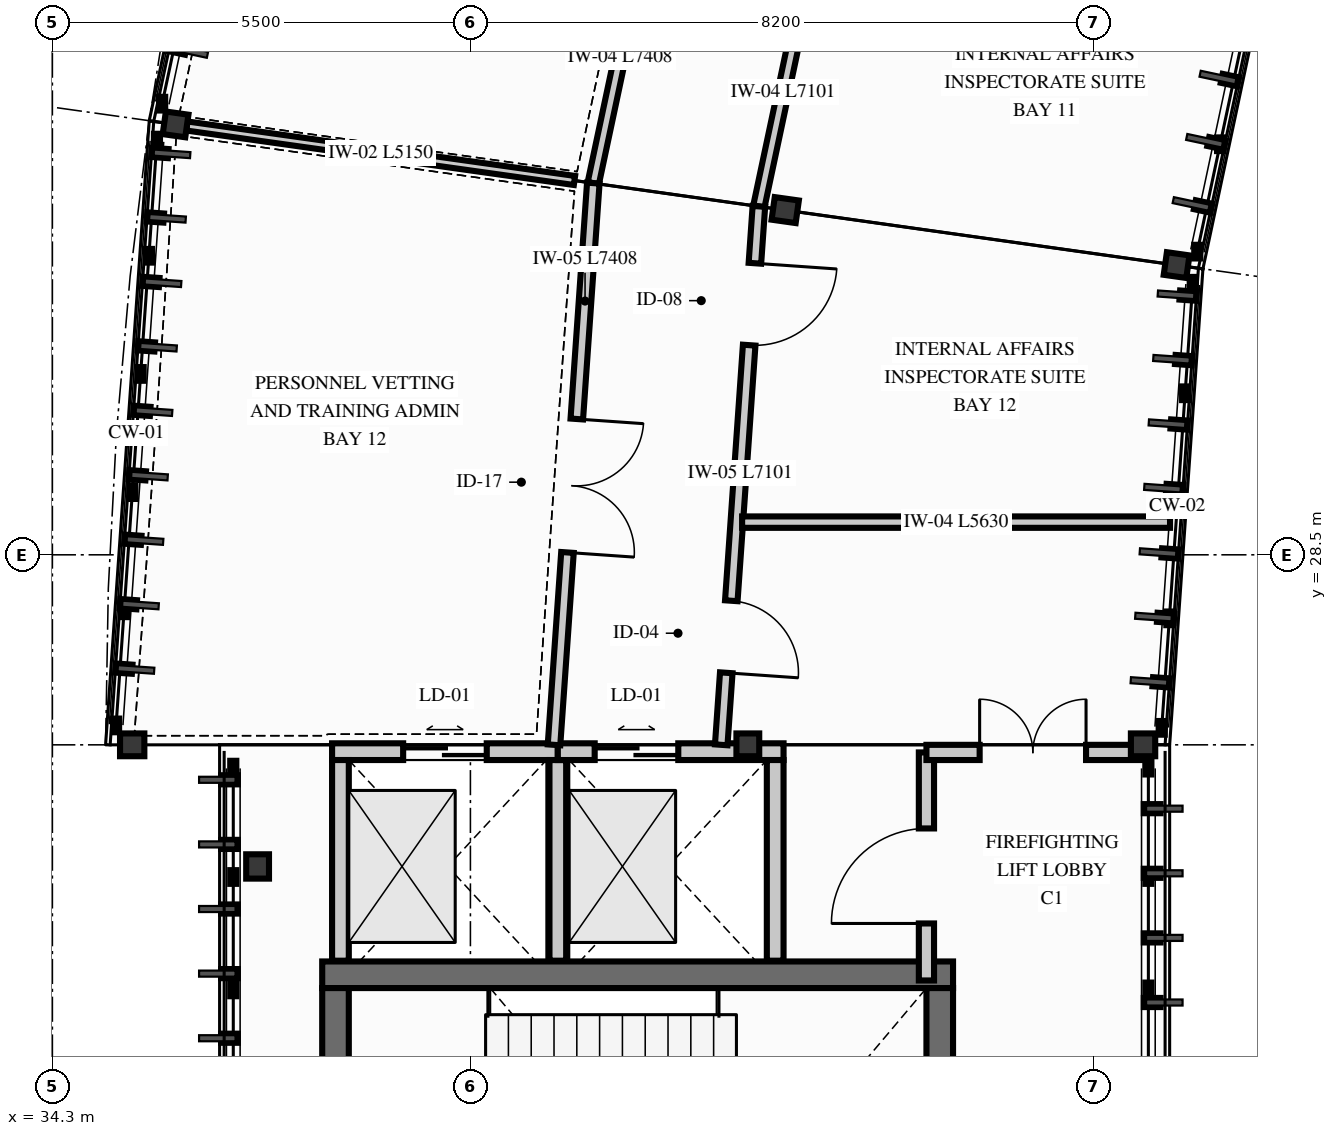
"""IFC4 building model, lengths in metres.
Left out: names, types, materials, properties, quantities, classifications, styles, units other than length and angle.
Written with IfcOpenShell. Run it as: python <this file> out.ifc"""

import sys

from ifc_helpers import new_model, si_unit, direction, frame, frame_2d, origin, origin_2d, place, context, subcontext, project, spatial, rectangle, i_section, extrude, element, fill, save


model = new_model("IFC4")
c1 = context("Model", 3, precision=1e-05, world=origin(), true_north=direction((0.0, 1.0)))
c2 = subcontext(c1, "Body", "Model", "MODEL_VIEW")
j1 = project(units=[si_unit("LENGTHUNIT", "METRE"), si_unit("PLANEANGLEUNIT", "RADIAN")], contexts=[c1])
p1 = place(None, origin())
s1 = spatial("IfcSite", under=j1, at=p1, CompositionType="ELEMENT")
p2 = place(p1, origin())
s2 = spatial("IfcBuilding", under=s1, at=p2, CompositionType="ELEMENT")
p3 = place(p2, frame((0.0, 0.0, 21.6)))
s3 = spatial("IfcBuildingStorey", under=s2, at=p3, CompositionType="ELEMENT", Elevation=21.6)
p4 = place(p3, frame((37.85, 22.975, 0.0), z_axis=(0.0, 0.0, 1.0), x_axis=(1.0, 0.0, 0.0)))
e1 = element("IfcWall", 1, at=p4, inside=s3, PredefinedType="SHEAR", context=c2, shape_type="SweptSolid", body=[
    extrude(rectangle(XDim=8.3, YDim=0.35, at=frame_2d((4.15, 0.0))), origin(), (0.0, 0.0, 1.0), 3.7),
])
p5 = place(p3, frame((38.025, 16.0, 0.0), z_axis=(0.0, 0.0, 1.0), x_axis=(0.0, 1.0, 0.0)))
e2 = element("IfcWall", 2, at=p5, inside=s3, PredefinedType="SHEAR", context=c2, shape_type="SweptSolid", body=[
    extrude(rectangle(XDim=6.8, YDim=0.35, at=frame_2d((3.4, 0.0))), origin(), (0.0, 0.0, 1.0), 3.7),
])
p6 = place(p5, frame((2.6, 0.0, 0.0)))
e3 = element("IfcOpeningElement", 3, at=p6, cuts=e2, PredefinedType="OPENING", context=c2, shape_type="SweptSolid", body=[
    extrude(rectangle(XDim=1.25, YDim=2.2, at=frame_2d((0.625, 1.1))), frame((0.0, 0.185, 0.0), z_axis=(0.0, -1.0, 0.0), x_axis=(1.0, 0.0, 0.0)), (0.0, 0.0, 1.0), 0.37),
])
p7 = place(p3, frame((45.975, 16.0, 0.0), z_axis=(0.0, 0.0, 1.0), x_axis=(0.0, 1.0, 0.0)))
e4 = element("IfcWall", 4, at=p7, inside=s3, PredefinedType="SHEAR", context=c2, shape_type="SweptSolid", body=[
    extrude(rectangle(XDim=6.8, YDim=0.35, at=frame_2d((3.4, 0.0))), origin(), (0.0, 0.0, 1.0), 3.7),
])
p8 = place(p3, frame((49.091, 32.312, 0.0), z_axis=(0.0, 0.0, 1.0), x_axis=(0.13917310096, 0.990268068742, 0.0)))
e5 = element("IfcColumn", 5, at=p8, inside=s3, PredefinedType="COLUMN", context=c2, shape_type="SweptSolid", body=[
    extrude(i_section(OverallWidth=0.3, OverallDepth=0.3, WebThickness=0.011, FlangeThickness=0.019, FilletRadius=0.027, at=origin_2d()), origin(), (0.0, 0.0, 1.0), 3.9),
])
p9 = place(p3, frame((43.942, 33.035, 0.0), z_axis=(0.0, 0.0, 1.0), x_axis=(0.13917310096, 0.990268068742, 0.0)))
e6 = element("IfcColumn", 6, at=p9, inside=s3, PredefinedType="COLUMN", context=c2, shape_type="SweptSolid", body=[
    extrude(i_section(OverallWidth=0.3, OverallDepth=0.32, WebThickness=0.011, FlangeThickness=0.021, FilletRadius=0.027, at=origin_2d()), origin(), (0.0, 0.0, 1.0), 3.9),
])
p10 = place(p3, frame((35.921, 34.163, 0.0), z_axis=(0.0, 0.0, 1.0), x_axis=(0.13917310096, 0.990268068742, 0.0)))
e7 = element("IfcColumn", 7, at=p10, inside=s3, PredefinedType="COLUMN", context=c2, shape_type="SweptSolid", body=[
    extrude(i_section(OverallWidth=0.3, OverallDepth=0.3, WebThickness=0.011, FlangeThickness=0.019, FilletRadius=0.027, at=origin_2d()), origin(), (0.0, 0.0, 1.0), 3.9),
])
p11 = place(p3, frame((48.65, 26.0, 0.0), z_axis=(0.0, 0.0, 1.0), x_axis=(0.0, 1.0, 0.0)))
e8 = element("IfcColumn", 8, at=p11, inside=s3, PredefinedType="COLUMN", context=c2, shape_type="SweptSolid", body=[
    extrude(i_section(OverallWidth=0.3, OverallDepth=0.32, WebThickness=0.011, FlangeThickness=0.021, FilletRadius=0.027, at=origin_2d()), origin(), (0.0, 0.0, 1.0), 3.9),
])
p12 = place(p3, frame((43.45, 26.0, 0.0), z_axis=(0.0, 0.0, 1.0), x_axis=(0.0, 1.0, 0.0)))
e9 = element("IfcColumn", 9, at=p12, inside=s3, PredefinedType="COLUMN", context=c2, shape_type="SweptSolid", body=[
    extrude(i_section(OverallWidth=0.3, OverallDepth=0.3, WebThickness=0.011, FlangeThickness=0.019, FilletRadius=0.027, at=origin_2d()), origin(), (0.0, 0.0, 1.0), 3.9),
])
for number, where, z_axis, x_axis in (
    (10, (35.35, 26.0, 0.0), (0.0, 0.0, 1.0), (0.0, 1.0, 0.0)),
    (11, (37.0, 24.4, 0.0), (0.0, 0.0, 1.0), (1.0, 0.0, 0.0)),
):
    element("IfcColumn", number, at=place(p3, frame(where, z_axis=z_axis, x_axis=x_axis)), inside=s3, PredefinedType="COLUMN", context=c2, shape_type="SweptSolid", body=[
        extrude(i_section(OverallWidth=0.3, OverallDepth=0.32, WebThickness=0.011, FlangeThickness=0.021, FilletRadius=0.027, at=origin_2d()), origin(), (0.0, 0.0, 1.0), 3.9),
    ])
p13 = place(p3, frame((37.98, 25.91, 0.0), z_axis=(0.0, 0.0, 1.0), x_axis=(1.0, 0.0, 0.0)))
e12 = element("IfcWall", 12, at=p13, inside=s3, PredefinedType="PARTITIONING", context=c2, shape_type="SweptSolid", body=[
    extrude(rectangle(XDim=2.97, YDim=0.22, at=frame_2d((1.485, 0.0))), origin(), (0.0, 0.0, 1.0), 3.25),
])
p14 = place(p13, frame((0.935, 0.0, 0.0)))
e13 = element("IfcOpeningElement", 13, at=p14, cuts=e12, PredefinedType="OPENING", context=c2, shape_type="SweptSolid", body=[
    extrude(rectangle(XDim=1.1, YDim=2.15, at=frame_2d((0.55, 1.075))), frame((0.0, 0.12, 0.0), z_axis=(0.0, -1.0, 0.0), x_axis=(1.0, 0.0, 0.0)), (0.0, 0.0, 1.0), 0.24),
])
for number, where, z_axis, x_axis in (
    (14, (38.09, 23.16, 0.0), (0.0, 0.0, 1.0), (0.0, 1.0, 0.0)),
    (15, (40.95, 23.16, 0.0), (0.0, 0.0, 1.0), (0.0, 1.0, 0.0)),
):
    element("IfcWall", number, at=place(p3, frame(where, z_axis=z_axis, x_axis=x_axis)), inside=s3, PredefinedType="PARTITIONING", context=c2, shape_type="SweptSolid", body=[
        extrude(rectangle(XDim=2.64, YDim=0.22, at=frame_2d((1.32, 0.0))), origin(), (0.0, 0.0, 1.0), 3.62),
    ])
p15 = place(p3, frame((40.95, 25.91, 0.0), z_axis=(0.0, 0.0, 1.0), x_axis=(1.0, 0.0, 0.0)))
e16 = element("IfcWall", 16, at=p15, inside=s3, PredefinedType="PARTITIONING", context=c2, shape_type="SweptSolid", body=[
    extrude(rectangle(XDim=2.97, YDim=0.22, at=frame_2d((1.485, 0.0))), origin(), (0.0, 0.0, 1.0), 3.25),
])
p16 = place(p15, frame((0.485, 0.0, 0.0)))
e17 = element("IfcOpeningElement", 17, at=p16, cuts=e16, PredefinedType="OPENING", context=c2, shape_type="SweptSolid", body=[
    extrude(rectangle(XDim=1.1, YDim=2.15, at=frame_2d((0.55, 1.075))), frame((0.0, 0.12, 0.0), z_axis=(0.0, -1.0, 0.0), x_axis=(1.0, 0.0, 0.0)), (0.0, 0.0, 1.0), 0.24),
])
p17 = place(p3, frame((43.81, 23.16, 0.0), z_axis=(0.0, 0.0, 1.0), x_axis=(0.0, 1.0, 0.0)))
e18 = element("IfcWall", 18, at=p17, inside=s3, PredefinedType="PARTITIONING", context=c2, shape_type="SweptSolid", body=[
    extrude(rectangle(XDim=2.64, YDim=0.22, at=frame_2d((1.32, 0.0))), origin(), (0.0, 0.0, 1.0), 3.62),
])
p18 = place(p3, frame((45.8, 22.9, 0.0), z_axis=(0.0, 0.0, 1.0), x_axis=(0.0, 1.0, 0.0)))
e19 = element("IfcWall", 19, at=p18, inside=s3, PredefinedType="PARTITIONING", context=c2, shape_type="SweptSolid", body=[
    extrude(rectangle(XDim=3.0, YDim=0.2, at=frame_2d((1.5, 0.0))), origin(), (0.0, 0.0, 1.0), 3.62),
])
p19 = place(p18, frame((0.75, 0.0, 0.0)))
e20 = element("IfcOpeningElement", 20, at=p19, cuts=e19, PredefinedType="OPENING", context=c2, shape_type="SweptSolid", body=[
    extrude(rectangle(XDim=1.25, YDim=2.2, at=frame_2d((0.625, 1.1))), frame((0.0, 0.11, 0.0), z_axis=(0.0, -1.0, 0.0), x_axis=(1.0, 0.0, 0.0)), (0.0, 0.0, 1.0), 0.22),
])
p20 = place(p3, frame((45.8, 25.9, 0.0), z_axis=(0.0, 0.0, 1.0), x_axis=(1.0, 0.0, 0.0)))
e21 = element("IfcWall", 21, at=p20, inside=s3, PredefinedType="PARTITIONING", context=c2, shape_type="SweptSolid", body=[
    extrude(rectangle(XDim=2.85, YDim=0.2, at=frame_2d((1.425, 0.0))), origin(), (0.0, 0.0, 1.0), 3.3),
])
p21 = place(p20, frame((0.7, 0.0, 0.0)))
e22 = element("IfcOpeningElement", 22, at=p21, cuts=e21, PredefinedType="OPENING", context=c2, shape_type="SweptSolid", body=[
    extrude(rectangle(XDim=1.4, YDim=2.25, at=frame_2d((0.7, 1.125))), frame((0.0, 0.11, 0.0), z_axis=(0.0, -1.0, 0.0), x_axis=(1.0, 0.0, 0.0)), (0.0, 0.0, 1.0), 0.22),
])
p22 = place(p3, frame((45.072, 40.03, 0.0), z_axis=(0.0, 0.0, 1.0), x_axis=(-0.207903987445, -0.978149238104, 0.0)))
e23 = element("IfcWall", 23, at=p22, inside=s3, PredefinedType="PARTITIONING", context=c2, shape_type="SweptSolid", body=[
    extrude(rectangle(XDim=7.101, YDim=0.15, at=frame_2d((3.551, 0.0))), origin(), (0.0, 0.0, 1.0), 3.62),
])
p23 = place(p22, frame((2.982, 0.0, 0.0)))
e24 = element("IfcOpeningElement", 24, at=p23, cuts=e23, PredefinedType="OPENING", context=c2, shape_type="SweptSolid", body=[
    extrude(rectangle(XDim=1.05, YDim=2.2, at=frame_2d((0.525, 1.1))), frame((0.0, 0.085, 0.0), z_axis=(0.0, -1.0, 0.0), x_axis=(1.0, 0.0, 0.0)), (0.0, 0.0, 1.0), 0.17),
])
p24 = place(p3, frame((42.957, 40.636, 0.0), z_axis=(0.0, 0.0, 1.0), x_axis=(-0.207921820376, -0.978145447575, 0.0)))
e25 = element("IfcWall", 25, at=p24, inside=s3, PredefinedType="PARTITIONING", context=c2, shape_type="SweptSolid", body=[
    extrude(rectangle(XDim=7.408, YDim=0.15, at=frame_2d((3.704, 0.0))), origin(), (0.0, 0.0, 1.0), 3.62),
])
p25 = place(p24, frame((3.111, 0.0, 0.0)))
e26 = element("IfcOpeningElement", 26, at=p25, cuts=e25, PredefinedType="OPENING", context=c2, shape_type="SweptSolid", body=[
    extrude(rectangle(XDim=0.9, YDim=2.1, at=frame_2d((0.45, 1.05))), frame((0.0, 0.085, 0.0), z_axis=(0.0, -1.0, 0.0), x_axis=(1.0, 0.0, 0.0)), (0.0, 0.0, 1.0), 0.17),
])
p26 = place(p3, frame((41.169, 33.425, 0.0), z_axis=(0.0, 0.0, 1.0), x_axis=(-0.990266484291, 0.13918437445, 0.0)))
e27 = element("IfcWall", 27, at=p26, inside=s3, PredefinedType="PARTITIONING", context=c2, shape_type="SweptSolid", body=[
    extrude(rectangle(XDim=5.15, YDim=0.12, at=frame_2d((2.575, 0.0))), origin(), (0.0, 0.0, 1.0), 3.25),
])
p27 = place(p3, frame((43.595, 33.084, 0.0), z_axis=(0.0, 0.0, 1.0), x_axis=(-0.069756597752, -0.997564041588, 0.0)))
e28 = element("IfcWall", 28, at=p27, inside=s3, PredefinedType="PARTITIONING", context=c2, shape_type="SweptSolid", body=[
    extrude(rectangle(XDim=7.101, YDim=0.165, at=frame_2d((3.551, 0.0))), origin(), (0.0, 0.0, 1.0), 3.62),
])
p28 = place(p27, frame((5.201, 0.0, 0.0)))
e29 = element("IfcOpeningElement", 29, at=p28, cuts=e28, PredefinedType="OPENING", context=c2, shape_type="SweptSolid", body=[
    extrude(rectangle(XDim=0.95, YDim=2.15, at=frame_2d((0.475, 1.075))), frame((0.0, 0.093, 0.0), z_axis=(0.0, -1.0, 0.0), x_axis=(1.0, 0.0, 0.0)), (0.0, 0.0, 1.0), 0.185),
])
p29 = place(p27, frame((0.75, 0.0, 0.0)))
e30 = element("IfcOpeningElement", 30, at=p29, cuts=e28, PredefinedType="OPENING", context=c2, shape_type="SweptSolid", body=[
    extrude(rectangle(XDim=1.08, YDim=2.22, at=frame_2d((0.54, 1.11))), frame((0.0, 0.093, 0.0), z_axis=(0.0, -1.0, 0.0), x_axis=(1.0, 0.0, 0.0)), (0.0, 0.0, 1.0), 0.185),
])
p30 = place(p3, frame((41.417, 33.39, 0.0), z_axis=(0.0, 0.0, 1.0), x_axis=(-0.069766817412, -0.997563326906, 0.0)))
e31 = element("IfcWall", 31, at=p30, inside=s3, PredefinedType="PARTITIONING", context=c2, shape_type="SweptSolid", body=[
    extrude(rectangle(XDim=7.408, YDim=0.165, at=frame_2d((3.704, 0.0))), origin(), (0.0, 0.0, 1.0), 3.62),
])
p31 = place(p30, frame((3.111, 0.0, 0.0)))
e32 = element("IfcOpeningElement", 32, at=p31, cuts=e31, PredefinedType="OPENING", context=c2, shape_type="SweptSolid", body=[
    extrude(rectangle(XDim=1.76, YDim=2.36, at=frame_2d((0.88, 1.18))), frame((0.0, 0.093, 0.0), z_axis=(0.0, -1.0, 0.0), x_axis=(1.0, 0.0, 0.0)), (0.0, 0.0, 1.0), 0.185),
])
p32 = place(p3, frame((43.375, 28.93, 0.0), z_axis=(0.0, 0.0, 1.0), x_axis=(1.0, 0.0, 0.0)))
e33 = element("IfcWall", 33, at=p32, inside=s3, PredefinedType="PARTITIONING", context=c2, shape_type="SweptSolid", body=[
    extrude(rectangle(XDim=5.63, YDim=0.15, at=frame_2d((2.815, 0.0))), origin(), (0.0, 0.0, 1.0), 3.398),
])
p33 = place(p14, origin())
e34 = element("IfcDoor", 34, at=p33, inside=s3, OperationType="DOUBLE_DOOR_SLIDING", PredefinedType="DOOR", context=c2, shape_type="SweptSolid", body=[
    extrude(rectangle(XDim=1.1, YDim=2.15, at=frame_2d((0.55, 1.075))), frame((0.0, 0.025, 0.0), z_axis=(0.0, -1.0, 0.0), x_axis=(1.0, 0.0, 0.0)), (0.0, 0.0, 1.0), 0.05),
])
fill(e13, e34)
p34 = place(p16, origin())
e35 = element("IfcDoor", 35, at=p34, inside=s3, OperationType="DOUBLE_DOOR_SLIDING", PredefinedType="DOOR", context=c2, shape_type="SweptSolid", body=[
    extrude(rectangle(XDim=1.1, YDim=2.15, at=frame_2d((0.55, 1.075))), frame((0.0, 0.025, 0.0), z_axis=(0.0, -1.0, 0.0), x_axis=(1.0, 0.0, 0.0)), (0.0, 0.0, 1.0), 0.05),
])
fill(e17, e35)
p35 = place(p21, origin())
e36 = element("IfcDoor", 36, at=p35, inside=s3, OperationType="DOUBLE_DOOR_SINGLE_SWING", PredefinedType="DOOR", context=c2, shape_type="SweptSolid", body=[
    extrude(rectangle(XDim=1.4, YDim=2.25, at=frame_2d((0.7, 1.125))), frame((0.0, 0.025, 0.0), z_axis=(0.0, -1.0, 0.0), x_axis=(1.0, 0.0, 0.0)), (0.0, 0.0, 1.0), 0.05),
])
fill(e22, e36)
p36 = place(p19, origin())
e37 = element("IfcDoor", 37, at=p36, inside=s3, OperationType="SINGLE_SWING_LEFT", PredefinedType="DOOR", context=c2, shape_type="SweptSolid", body=[
    extrude(rectangle(XDim=1.25, YDim=2.2, at=frame_2d((0.625, 1.1))), frame((0.0, 0.025, 0.0), z_axis=(0.0, -1.0, 0.0), x_axis=(1.0, 0.0, 0.0)), (0.0, 0.0, 1.0), 0.05),
])
fill(e20, e37)
p37 = place(p28, origin())
e38 = element("IfcDoor", 38, at=p37, inside=s3, OperationType="SINGLE_SWING_RIGHT", PredefinedType="DOOR", context=c2, shape_type="SweptSolid", body=[
    extrude(rectangle(XDim=0.95, YDim=2.15, at=frame_2d((0.475, 1.075))), frame((0.0, 0.025, 0.0), z_axis=(0.0, -1.0, 0.0), x_axis=(1.0, 0.0, 0.0)), (0.0, 0.0, 1.0), 0.05),
])
fill(e29, e38)
p38 = place(p29, origin())
e39 = element("IfcDoor", 39, at=p38, inside=s3, OperationType="SINGLE_SWING_LEFT", PredefinedType="DOOR", context=c2, shape_type="SweptSolid", body=[
    extrude(rectangle(XDim=1.08, YDim=2.22, at=frame_2d((0.54, 1.11))), frame((0.0, 0.025, 0.0), z_axis=(0.0, -1.0, 0.0), x_axis=(1.0, 0.0, 0.0)), (0.0, 0.0, 1.0), 0.05),
])
fill(e30, e39)
p39 = place(p31, origin())
e40 = element("IfcDoor", 40, at=p39, inside=s3, OperationType="DOUBLE_DOOR_SINGLE_SWING", PredefinedType="DOOR", context=c2, shape_type="SweptSolid", body=[
    extrude(rectangle(XDim=1.76, YDim=2.36, at=frame_2d((0.88, 1.18))), frame((0.0, 0.025, 0.0), z_axis=(0.0, -1.0, 0.0), x_axis=(1.0, 0.0, 0.0)), (0.0, 0.0, 1.0), 0.05),
])
fill(e32, e40)
save(model, sys.argv[1])
